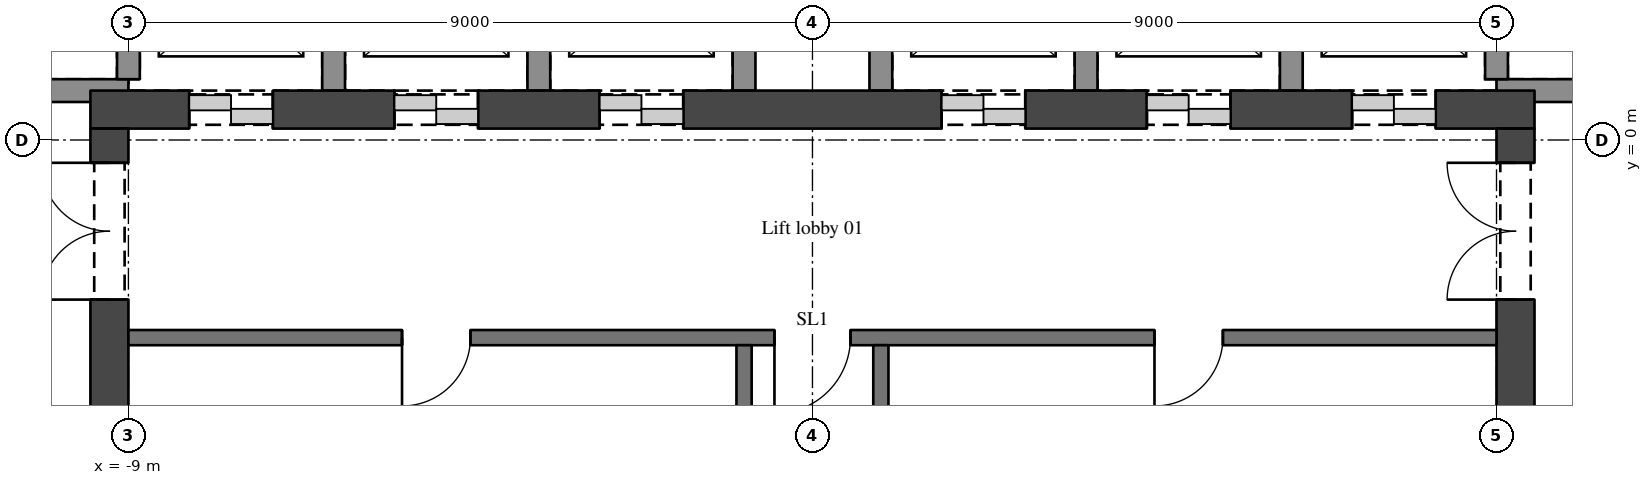
"""IFC4 building model, lengths in metres.
Left out: names, types, materials, properties, quantities, classifications, styles, units other than length and angle.
Written with IfcOpenShell. Run it as: python <this file> out.ifc"""

import sys

from ifc_helpers import new_model, si_unit, direction, frame, frame_2d, origin, place, context, subcontext, project, spatial, rectangle, extrude, element, fill, save


model = new_model("IFC4")
c1 = context("Model", 3, precision=1e-05, world=origin(), true_north=direction((0.0, 1.0)))
c2 = subcontext(c1, "Body", "Model", "MODEL_VIEW")
j1 = project(units=[si_unit("LENGTHUNIT", "METRE"), si_unit("PLANEANGLEUNIT", "RADIAN")], contexts=[c1])
p1 = place(None, origin())
s1 = spatial("IfcSite", under=j1, at=p1, CompositionType="ELEMENT")
p2 = place(p1, origin())
s2 = spatial("IfcBuilding", under=s1, at=p2, CompositionType="ELEMENT")
p3 = place(p2, frame((0.0, 0.0, 121.5)))
s3 = spatial("IfcBuildingStorey", under=s2, at=p3, CompositionType="ELEMENT", Elevation=121.5)
p4 = place(p3, frame((-9.5, 0.4, 0.0), z_axis=(0.0, 0.0, 1.0), x_axis=(1.0, 0.0, 0.0)))
e1 = element("IfcWall", 1, at=p4, inside=s3, PredefinedType="SHEAR", context=c2, shape_type="SweptSolid", body=[
    extrude(rectangle(XDim=19.0, YDim=0.5, at=frame_2d((9.5, 0.0))), origin(), (0.0, 0.0, 1.0), 3.4),
])
p5 = place(p4, frame((1.3, 0.0, 0.0)))
e2 = element("IfcOpeningElement", 2, at=p5, cuts=e1, PredefinedType="OPENING", context=c2, shape_type="SweptSolid", body=[
    extrude(rectangle(XDim=1.1, YDim=2.1, at=frame_2d((0.55, 1.05))), frame((0.0, 0.26, 0.0), z_axis=(0.0, -1.0, 0.0), x_axis=(1.0, 0.0, 0.0)), (0.0, 0.0, 1.0), 0.52),
])
p6 = place(p4, frame((4.0, 0.0, 0.0)))
e3 = element("IfcOpeningElement", 3, at=p6, cuts=e1, PredefinedType="OPENING", context=c2, shape_type="SweptSolid", body=[
    extrude(rectangle(XDim=1.1, YDim=2.1, at=frame_2d((0.55, 1.05))), frame((0.0, 0.26, 0.0), z_axis=(0.0, -1.0, 0.0), x_axis=(1.0, 0.0, 0.0)), (0.0, 0.0, 1.0), 0.52),
])
p7 = place(p4, frame((6.7, 0.0, 0.0)))
e4 = element("IfcOpeningElement", 4, at=p7, cuts=e1, PredefinedType="OPENING", context=c2, shape_type="SweptSolid", body=[
    extrude(rectangle(XDim=1.1, YDim=2.1, at=frame_2d((0.55, 1.05))), frame((0.0, 0.26, 0.0), z_axis=(0.0, -1.0, 0.0), x_axis=(1.0, 0.0, 0.0)), (0.0, 0.0, 1.0), 0.52),
])
p8 = place(p4, frame((11.2, 0.0, 0.0)))
e5 = element("IfcOpeningElement", 5, at=p8, cuts=e1, PredefinedType="OPENING", context=c2, shape_type="SweptSolid", body=[
    extrude(rectangle(XDim=1.1, YDim=2.1, at=frame_2d((0.55, 1.05))), frame((0.0, 0.26, 0.0), z_axis=(0.0, -1.0, 0.0), x_axis=(1.0, 0.0, 0.0)), (0.0, 0.0, 1.0), 0.52),
])
p9 = place(p4, frame((13.9, 0.0, 0.0)))
e6 = element("IfcOpeningElement", 6, at=p9, cuts=e1, PredefinedType="OPENING", context=c2, shape_type="SweptSolid", body=[
    extrude(rectangle(XDim=1.1, YDim=2.1, at=frame_2d((0.55, 1.05))), frame((0.0, 0.26, 0.0), z_axis=(0.0, -1.0, 0.0), x_axis=(1.0, 0.0, 0.0)), (0.0, 0.0, 1.0), 0.52),
])
p10 = place(p4, frame((16.6, 0.0, 0.0)))
e7 = element("IfcOpeningElement", 7, at=p10, cuts=e1, PredefinedType="OPENING", context=c2, shape_type="SweptSolid", body=[
    extrude(rectangle(XDim=1.1, YDim=2.1, at=frame_2d((0.55, 1.05))), frame((0.0, 0.26, 0.0), z_axis=(0.0, -1.0, 0.0), x_axis=(1.0, 0.0, 0.0)), (0.0, 0.0, 1.0), 0.52),
])
p11 = place(p3, frame((-9.25, -11.5, 0.0), z_axis=(0.0, 0.0, 1.0), x_axis=(0.0, 1.0, 0.0)))
e8 = element("IfcWall", 8, at=p11, inside=s3, PredefinedType="SHEAR", context=c2, shape_type="SweptSolid", body=[
    extrude(rectangle(XDim=11.65, YDim=0.5, at=frame_2d((5.825, 0.0))), origin(), (0.0, 0.0, 1.0), 3.4),
])
p12 = place(p11, frame((9.4, 0.0, 0.0)))
e9 = element("IfcOpeningElement", 9, at=p12, cuts=e8, PredefinedType="OPENING", context=c2, shape_type="SweptSolid", body=[
    extrude(rectangle(XDim=1.8, YDim=2.1, at=frame_2d((0.9, 1.05))), frame((0.0, 0.26, 0.0), z_axis=(0.0, -1.0, 0.0), x_axis=(1.0, 0.0, 0.0)), (0.0, 0.0, 1.0), 0.52),
])
p13 = place(p11, frame((5.25, 0.0, 0.0)))
e10 = element("IfcOpeningElement", 10, at=p13, cuts=e8, PredefinedType="OPENING", context=c2, shape_type="SweptSolid", body=[
    extrude(rectangle(XDim=1.1, YDim=2.1, at=frame_2d((0.55, 1.05))), frame((0.0, 0.26, 0.0), z_axis=(0.0, -1.0, 0.0), x_axis=(1.0, 0.0, 0.0)), (0.0, 0.0, 1.0), 0.52),
])
p14 = place(p3, frame((9.25, -11.5, 0.0), z_axis=(0.0, 0.0, 1.0), x_axis=(0.0, 1.0, 0.0)))
e11 = element("IfcWall", 11, at=p14, inside=s3, PredefinedType="SHEAR", context=c2, shape_type="SweptSolid", body=[
    extrude(rectangle(XDim=11.65, YDim=0.5, at=frame_2d((5.825, 0.0))), origin(), (0.0, 0.0, 1.0), 3.4),
])
p15 = place(p14, frame((9.4, 0.0, 0.0)))
e12 = element("IfcOpeningElement", 12, at=p15, cuts=e11, PredefinedType="OPENING", context=c2, shape_type="SweptSolid", body=[
    extrude(rectangle(XDim=1.8, YDim=2.1, at=frame_2d((0.9, 1.05))), frame((0.0, 0.26, 0.0), z_axis=(0.0, -1.0, 0.0), x_axis=(1.0, 0.0, 0.0)), (0.0, 0.0, 1.0), 0.52),
])
p16 = place(p14, frame((5.25, 0.0, 0.0)))
e13 = element("IfcOpeningElement", 13, at=p16, cuts=e11, PredefinedType="OPENING", context=c2, shape_type="SweptSolid", body=[
    extrude(rectangle(XDim=1.1, YDim=2.1, at=frame_2d((0.55, 1.05))), frame((0.0, 0.26, 0.0), z_axis=(0.0, -1.0, 0.0), x_axis=(1.0, 0.0, 0.0)), (0.0, 0.0, 1.0), 0.52),
])
p17 = place(p3, frame((9.0, -2.6, 0.0), z_axis=(0.0, 0.0, 1.0), x_axis=(-1.0, 0.0, 0.0)))
e14 = element("IfcWall", 14, at=p17, inside=s3, PredefinedType="SOLIDWALL", context=c2, shape_type="SweptSolid", body=[
    extrude(rectangle(XDim=18.0, YDim=0.2, at=frame_2d((9.0, 0.0))), origin(), (0.0, 0.0, 1.0), 3.1),
])
p18 = place(p17, frame((8.5, 0.0, 0.0)))
e15 = element("IfcOpeningElement", 15, at=p18, cuts=e14, PredefinedType="OPENING", context=c2, shape_type="SweptSolid", body=[
    extrude(rectangle(XDim=1.0, YDim=2.1, at=frame_2d((0.5, 1.05))), frame((0.0, 0.11, 0.0), z_axis=(0.0, -1.0, 0.0), x_axis=(1.0, 0.0, 0.0)), (0.0, 0.0, 1.0), 0.22),
])
p19 = place(p17, frame((13.5, 0.0, 0.0)))
e16 = element("IfcOpeningElement", 16, at=p19, cuts=e14, PredefinedType="OPENING", context=c2, shape_type="SweptSolid", body=[
    extrude(rectangle(XDim=0.9, YDim=2.1, at=frame_2d((0.45, 1.05))), frame((0.0, 0.11, 0.0), z_axis=(0.0, -1.0, 0.0), x_axis=(1.0, 0.0, 0.0)), (0.0, 0.0, 1.0), 0.22),
])
p20 = place(p17, frame((3.6, 0.0, 0.0)))
e17 = element("IfcOpeningElement", 17, at=p20, cuts=e14, PredefinedType="OPENING", context=c2, shape_type="SweptSolid", body=[
    extrude(rectangle(XDim=0.9, YDim=2.1, at=frame_2d((0.45, 1.05))), frame((0.0, 0.11, 0.0), z_axis=(0.0, -1.0, 0.0), x_axis=(1.0, 0.0, 0.0)), (0.0, 0.0, 1.0), 0.22),
])
for number, where, z_axis, x_axis in (
    (18, (-9.0, 0.65, 0.0), (0.0, 0.0, 1.0), (-1.0, 0.0, 0.0)),
    (19, (12.25, 0.65, 0.0), (0.0, 0.0, 1.0), (-1.0, 0.0, 0.0)),
):
    element("IfcWall", number, at=place(p3, frame(where, z_axis=z_axis, x_axis=x_axis)), inside=s3, PredefinedType="SHEAR", context=c2, shape_type="SweptSolid", body=[
        extrude(rectangle(XDim=3.25, YDim=0.3, at=frame_2d((1.625, 0.0))), origin(), (0.0, 0.0, 1.0), 3.4),
    ])
p21 = place(p3, frame((-9.0, 0.8, 0.0), z_axis=(0.0, 0.0, 1.0), x_axis=(0.0, 1.0, 0.0)))
e20 = element("IfcWall", 20, at=p21, inside=s3, PredefinedType="SHEAR", context=c2, shape_type="SweptSolid", body=[
    extrude(rectangle(XDim=2.35, YDim=0.3, at=frame_2d((1.175, 0.0))), origin(), (0.0, 0.0, 1.0), 3.4),
])
for number, where, z_axis, x_axis in (
    (21, (-6.3, 0.65, 0.0), (0.0, 0.0, 1.0), (0.0, 1.0, 0.0)),
    (22, (-3.6, 0.65, 0.0), (0.0, 0.0, 1.0), (0.0, 1.0, 0.0)),
):
    element("IfcWall", number, at=place(p3, frame(where, z_axis=z_axis, x_axis=x_axis)), inside=s3, PredefinedType="SHEAR", context=c2, shape_type="SweptSolid", body=[
        extrude(rectangle(XDim=2.5, YDim=0.3, at=frame_2d((1.25, 0.0))), origin(), (0.0, 0.0, 1.0), 3.4),
    ])
p22 = place(p3, frame((-0.9, -4.85, 0.0), z_axis=(0.0, 0.0, 1.0), x_axis=(0.0, 1.0, 0.0)))
e23 = element("IfcWall", 23, at=p22, inside=s3, PredefinedType="SOLIDWALL", context=c2, shape_type="SweptSolid", body=[
    extrude(rectangle(XDim=2.15, YDim=0.2, at=frame_2d((1.075, 0.0))), origin(), (0.0, 0.0, 1.0), 3.1),
])
p23 = place(p3, frame((-0.9, 0.65, 0.0), z_axis=(0.0, 0.0, 1.0), x_axis=(0.0, 1.0, 0.0)))
e24 = element("IfcWall", 24, at=p23, inside=s3, PredefinedType="SHEAR", context=c2, shape_type="SweptSolid", body=[
    extrude(rectangle(XDim=2.5, YDim=0.3, at=frame_2d((1.25, 0.0))), origin(), (0.0, 0.0, 1.0), 3.4),
])
p24 = place(p3, frame((0.9, -4.85, 0.0), z_axis=(0.0, 0.0, 1.0), x_axis=(0.0, 1.0, 0.0)))
e25 = element("IfcWall", 25, at=p24, inside=s3, PredefinedType="SOLIDWALL", context=c2, shape_type="SweptSolid", body=[
    extrude(rectangle(XDim=2.15, YDim=0.2, at=frame_2d((1.075, 0.0))), origin(), (0.0, 0.0, 1.0), 3.1),
])
for number, where, z_axis, x_axis in (
    (26, (0.9, 0.65, 0.0), (0.0, 0.0, 1.0), (0.0, 1.0, 0.0)),
    (27, (3.6, 0.65, 0.0), (0.0, 0.0, 1.0), (0.0, 1.0, 0.0)),
    (28, (6.3, 0.65, 0.0), (0.0, 0.0, 1.0), (0.0, 1.0, 0.0)),
):
    element("IfcWall", number, at=place(p3, frame(where, z_axis=z_axis, x_axis=x_axis)), inside=s3, PredefinedType="SHEAR", context=c2, shape_type="SweptSolid", body=[
        extrude(rectangle(XDim=2.5, YDim=0.3, at=frame_2d((1.25, 0.0))), origin(), (0.0, 0.0, 1.0), 3.4),
    ])
p25 = place(p3, frame((9.0, 0.8, 0.0), z_axis=(0.0, 0.0, 1.0), x_axis=(0.0, 1.0, 0.0)))
e29 = element("IfcWall", 29, at=p25, inside=s3, PredefinedType="SHEAR", context=c2, shape_type="SweptSolid", body=[
    extrude(rectangle(XDim=2.35, YDim=0.3, at=frame_2d((1.175, 0.0))), origin(), (0.0, 0.0, 1.0), 3.4),
])
p26 = place(p15, origin())
e30 = element("IfcDoor", 30, at=p26, inside=s3, OperationType="DOUBLE_DOOR_SINGLE_SWING", PredefinedType="DOOR", context=c2, shape_type="SweptSolid", body=[
    extrude(rectangle(XDim=1.8, YDim=2.1, at=frame_2d((0.9, 1.05))), frame((0.0, 0.025, 0.0), z_axis=(0.0, -1.0, 0.0), x_axis=(1.0, 0.0, 0.0)), (0.0, 0.0, 1.0), 0.05),
])
fill(e12, e30)
p27 = place(p12, origin())
e31 = element("IfcDoor", 31, at=p27, inside=s3, OperationType="DOUBLE_DOOR_SINGLE_SWING", PredefinedType="DOOR", context=c2, shape_type="SweptSolid", body=[
    extrude(rectangle(XDim=1.8, YDim=2.1, at=frame_2d((0.9, 1.05))), frame((0.0, 0.025, 0.0), z_axis=(0.0, -1.0, 0.0), x_axis=(1.0, 0.0, 0.0)), (0.0, 0.0, 1.0), 0.05),
])
fill(e9, e31)
p28 = place(p18, origin())
e32 = element("IfcDoor", 32, at=p28, inside=s3, OperationType="SINGLE_SWING_RIGHT", PredefinedType="DOOR", context=c2, shape_type="SweptSolid", body=[
    extrude(rectangle(XDim=1.0, YDim=2.1, at=frame_2d((0.5, 1.05))), frame((0.0, 0.025, 0.0), z_axis=(0.0, -1.0, 0.0), x_axis=(1.0, 0.0, 0.0)), (0.0, 0.0, 1.0), 0.05),
])
fill(e15, e32)
p29 = place(p19, origin())
e33 = element("IfcDoor", 33, at=p29, inside=s3, OperationType="SINGLE_SWING_RIGHT", PredefinedType="DOOR", context=c2, shape_type="SweptSolid", body=[
    extrude(rectangle(XDim=0.9, YDim=2.1, at=frame_2d((0.45, 1.05))), frame((0.0, 0.025, 0.0), z_axis=(0.0, -1.0, 0.0), x_axis=(1.0, 0.0, 0.0)), (0.0, 0.0, 1.0), 0.05),
])
fill(e16, e33)
p30 = place(p20, origin())
e34 = element("IfcDoor", 34, at=p30, inside=s3, OperationType="SINGLE_SWING_RIGHT", PredefinedType="DOOR", context=c2, shape_type="SweptSolid", body=[
    extrude(rectangle(XDim=0.9, YDim=2.1, at=frame_2d((0.45, 1.05))), frame((0.0, 0.025, 0.0), z_axis=(0.0, -1.0, 0.0), x_axis=(1.0, 0.0, 0.0)), (0.0, 0.0, 1.0), 0.05),
])
fill(e17, e34)
p31 = place(p5, origin())
e35 = element("IfcDoor", 35, at=p31, inside=s3, OperationType="DOUBLE_DOOR_SLIDING", PredefinedType="DOOR", context=c2, shape_type="SweptSolid", body=[
    extrude(rectangle(XDim=1.1, YDim=2.1, at=frame_2d((0.55, 1.05))), frame((0.0, 0.025, 0.0), z_axis=(0.0, -1.0, 0.0), x_axis=(1.0, 0.0, 0.0)), (0.0, 0.0, 1.0), 0.05),
])
fill(e2, e35)
p32 = place(p6, origin())
e36 = element("IfcDoor", 36, at=p32, inside=s3, OperationType="DOUBLE_DOOR_SLIDING", PredefinedType="DOOR", context=c2, shape_type="SweptSolid", body=[
    extrude(rectangle(XDim=1.1, YDim=2.1, at=frame_2d((0.55, 1.05))), frame((0.0, 0.025, 0.0), z_axis=(0.0, -1.0, 0.0), x_axis=(1.0, 0.0, 0.0)), (0.0, 0.0, 1.0), 0.05),
])
fill(e3, e36)
p33 = place(p7, origin())
e37 = element("IfcDoor", 37, at=p33, inside=s3, OperationType="DOUBLE_DOOR_SLIDING", PredefinedType="DOOR", context=c2, shape_type="SweptSolid", body=[
    extrude(rectangle(XDim=1.1, YDim=2.1, at=frame_2d((0.55, 1.05))), frame((0.0, 0.025, 0.0), z_axis=(0.0, -1.0, 0.0), x_axis=(1.0, 0.0, 0.0)), (0.0, 0.0, 1.0), 0.05),
])
fill(e4, e37)
p34 = place(p8, origin())
e38 = element("IfcDoor", 38, at=p34, inside=s3, OperationType="DOUBLE_DOOR_SLIDING", PredefinedType="DOOR", context=c2, shape_type="SweptSolid", body=[
    extrude(rectangle(XDim=1.1, YDim=2.1, at=frame_2d((0.55, 1.05))), frame((0.0, 0.025, 0.0), z_axis=(0.0, -1.0, 0.0), x_axis=(1.0, 0.0, 0.0)), (0.0, 0.0, 1.0), 0.05),
])
fill(e5, e38)
p35 = place(p9, origin())
e39 = element("IfcDoor", 39, at=p35, inside=s3, OperationType="DOUBLE_DOOR_SLIDING", PredefinedType="DOOR", context=c2, shape_type="SweptSolid", body=[
    extrude(rectangle(XDim=1.1, YDim=2.1, at=frame_2d((0.55, 1.05))), frame((0.0, 0.025, 0.0), z_axis=(0.0, -1.0, 0.0), x_axis=(1.0, 0.0, 0.0)), (0.0, 0.0, 1.0), 0.05),
])
fill(e6, e39)
p36 = place(p10, origin())
e40 = element("IfcDoor", 40, at=p36, inside=s3, OperationType="DOUBLE_DOOR_SLIDING", PredefinedType="DOOR", context=c2, shape_type="SweptSolid", body=[
    extrude(rectangle(XDim=1.1, YDim=2.1, at=frame_2d((0.55, 1.05))), frame((0.0, 0.025, 0.0), z_axis=(0.0, -1.0, 0.0), x_axis=(1.0, 0.0, 0.0)), (0.0, 0.0, 1.0), 0.05),
])
fill(e7, e40)
save(model, sys.argv[1])
